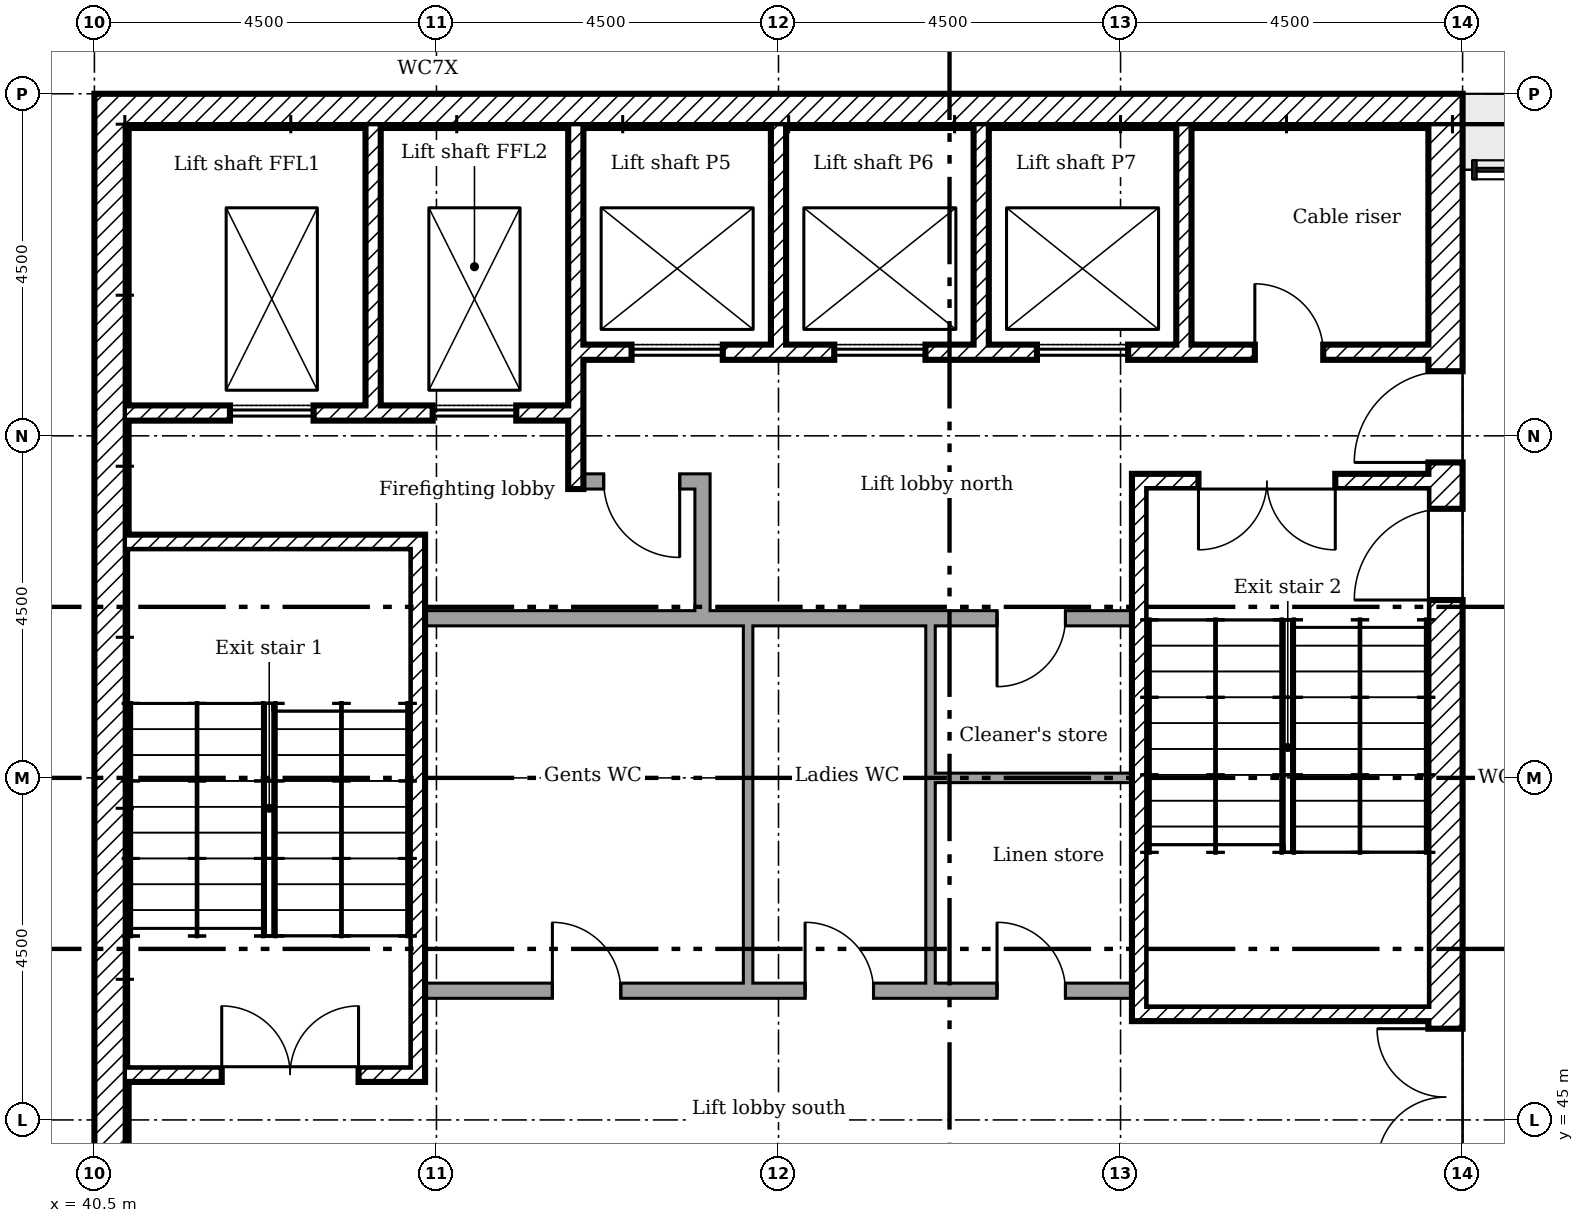
"""IFC4 building model, lengths in metres.
Left out: names, types, materials, properties, quantities, classifications, styles, units other than length and angle.
Written with IfcOpenShell. Run it as: python <this file> out.ifc"""

import sys

from ifc_helpers import new_model, si_unit, direction, frame, frame_2d, origin, place, context, subcontext, project, spatial, rectangle, extrude, element, fill, save


model = new_model("IFC4")
c1 = context("Model", 3, precision=1e-05, world=origin(), true_north=direction((0.0, 1.0)))
c2 = subcontext(c1, "Body", "Model", "MODEL_VIEW")
j1 = project(units=[si_unit("LENGTHUNIT", "METRE"), si_unit("PLANEANGLEUNIT", "RADIAN")], contexts=[c1])
p1 = place(None, origin())
s1 = spatial("IfcSite", under=j1, at=p1, CompositionType="ELEMENT")
p2 = place(p1, origin())
s2 = spatial("IfcBuilding", under=s1, at=p2, CompositionType="ELEMENT")
p3 = place(p2, frame((0.0, 0.0, 269.6)))
s3 = spatial("IfcBuildingStorey", under=s2, at=p3, CompositionType="ELEMENT", Elevation=269.6)
p4 = place(p3, frame((58.275, 40.5, 0.0), z_axis=(0.0, 0.0, 1.0), x_axis=(0.0, 1.0, 0.0)))
e1 = element("IfcWall", 1, at=p4, inside=s3, PredefinedType="SHEAR", context=c2, shape_type="SweptSolid", body=[
    extrude(rectangle(XDim=18.0, YDim=0.45, at=frame_2d((9.0, 0.0))), origin(), (0.0, 0.0, 1.0), 4.75),
])
p5 = place(p4, frame((13.15, 0.0, 0.0)))
e2 = element("IfcOpeningElement", 2, at=p5, cuts=e1, PredefinedType="OPENING", context=c2, shape_type="SweptSolid", body=[
    extrude(rectangle(XDim=1.2, YDim=2.1, at=frame_2d((0.6, 1.05))), frame((0.0, 0.235, 0.0), z_axis=(0.0, -1.0, 0.0), x_axis=(1.0, 0.0, 0.0)), (0.0, 0.0, 1.0), 0.47),
])
p6 = place(p4, frame((3.9, 0.0, 0.0)))
e3 = element("IfcOpeningElement", 3, at=p6, cuts=e1, PredefinedType="OPENING", context=c2, shape_type="SweptSolid", body=[
    extrude(rectangle(XDim=1.8, YDim=2.1, at=frame_2d((0.9, 1.05))), frame((0.0, 0.235, 0.0), z_axis=(0.0, -1.0, 0.0), x_axis=(1.0, 0.0, 0.0)), (0.0, 0.0, 1.0), 0.47),
])
p7 = place(p4, frame((11.34, 0.0, 0.0)))
e4 = element("IfcOpeningElement", 4, at=p7, cuts=e1, PredefinedType="OPENING", context=c2, shape_type="SweptSolid", body=[
    extrude(rectangle(XDim=1.2, YDim=2.1, at=frame_2d((0.6, 1.05))), frame((0.0, 0.235, 0.0), z_axis=(0.0, -1.0, 0.0), x_axis=(1.0, 0.0, 0.0)), (0.0, 0.0, 1.0), 0.47),
])
p8 = place(p3, frame((40.5, 58.275, 0.0)))
e5 = element("IfcWall", 5, at=p8, inside=s3, PredefinedType="SHEAR", context=c2, shape_type="SweptSolid", body=[
    extrude(rectangle(XDim=17.55, YDim=0.45, at=frame_2d((8.775, 0.0))), origin(), (0.0, 0.0, 1.0), 4.75),
])
p9 = place(p3, frame((40.725, 40.95, 0.0), z_axis=(0.0, 0.0, 1.0), x_axis=(0.0, 1.0, 0.0)))
e6 = element("IfcWall", 6, at=p9, inside=s3, PredefinedType="SHEAR", context=c2, shape_type="SweptSolid", body=[
    extrude(rectangle(XDim=17.1, YDim=0.45, at=frame_2d((8.55, 0.0))), origin(), (0.0, 0.0, 1.0), 4.75),
])
p10 = place(p3, frame((44.167, 58.05, 0.0), z_axis=(0.0, 0.0, 1.0), x_axis=(0.0, -1.0, 0.0)))
e7 = element("IfcWall", 7, at=p10, inside=s3, PredefinedType="SHEAR", context=c2, shape_type="SweptSolid", body=[
    extrude(rectangle(XDim=3.65, YDim=0.2, at=frame_2d((1.825, 0.0))), origin(), (0.0, 0.0, 1.0), 4.75),
])
p11 = place(p3, frame((46.833, 58.05, 0.0), z_axis=(0.0, 0.0, 1.0), x_axis=(0.0, -1.0, 0.0)))
e8 = element("IfcWall", 8, at=p11, inside=s3, PredefinedType="SHEAR", context=c2, shape_type="SweptSolid", body=[
    extrude(rectangle(XDim=4.75, YDim=0.2, at=frame_2d((2.375, 0.0))), origin(), (0.0, 0.0, 1.0), 4.75),
])
for number, where, z_axis, x_axis in (
    (9, (49.5, 58.05, 0.0), (0.0, 0.0, 1.0), (0.0, -1.0, 0.0)),
    (10, (52.167, 58.05, 0.0), (0.0, 0.0, 1.0), (0.0, -1.0, 0.0)),
    (11, (54.833, 58.05, 0.0), (0.0, 0.0, 1.0), (0.0, -1.0, 0.0)),
):
    element("IfcWall", number, at=place(p3, frame(where, z_axis=z_axis, x_axis=x_axis)), inside=s3, PredefinedType="SHEAR", context=c2, shape_type="SweptSolid", body=[
        extrude(rectangle(XDim=2.85, YDim=0.2, at=frame_2d((1.425, 0.0))), origin(), (0.0, 0.0, 1.0), 4.75),
    ])
p12 = place(p3, frame((48.5, 51.6, 0.0), z_axis=(0.0, 0.0, 1.0), x_axis=(0.0, 1.0, 0.0)))
e12 = element("IfcWall", 12, at=p12, inside=s3, PredefinedType="PARTITIONING", context=c2, shape_type="SweptSolid", body=[
    extrude(rectangle(XDim=1.9, YDim=0.2, at=frame_2d((0.95, 0.0))), origin(), (0.0, 0.0, 1.0), 4.75),
])
p13 = place(p3, frame((46.933, 53.4, 0.0)))
e13 = element("IfcWall", 13, at=p13, inside=s3, PredefinedType="PARTITIONING", context=c2, shape_type="SweptSolid", body=[
    extrude(rectangle(XDim=1.467, YDim=0.2, at=frame_2d((0.733, 0.0))), origin(), (0.0, 0.0, 1.0), 4.75),
])
p14 = place(p13, frame((0.267, 0.0, 0.0)))
e14 = element("IfcOpeningElement", 14, at=p14, cuts=e13, PredefinedType="OPENING", context=c2, shape_type="SweptSolid", body=[
    extrude(rectangle(XDim=1.0, YDim=2.1, at=frame_2d((0.5, 1.05))), frame((0.0, 0.11, 0.0), z_axis=(0.0, -1.0, 0.0), x_axis=(1.0, 0.0, 0.0)), (0.0, 0.0, 1.0), 0.22),
])
p15 = place(p3, frame((46.933, 55.1, 0.0)))
e15 = element("IfcWall", 15, at=p15, inside=s3, PredefinedType="SHEAR", context=c2, shape_type="SweptSolid", body=[
    extrude(rectangle(XDim=11.117, YDim=0.2, at=frame_2d((5.558, 0.0))), origin(), (0.0, 0.0, 1.0), 4.75),
])
p16 = place(p15, frame((8.833, 0.0, 0.0)))
e16 = element("IfcOpeningElement", 16, at=p16, cuts=e15, PredefinedType="OPENING", context=c2, shape_type="SweptSolid", body=[
    extrude(rectangle(XDim=0.9, YDim=2.1, at=frame_2d((0.45, 1.05))), frame((0.0, 0.11, 0.0), z_axis=(0.0, -1.0, 0.0), x_axis=(1.0, 0.0, 0.0)), (0.0, 0.0, 1.0), 0.22),
])
p17 = place(p15, frame((0.633, 0.0, 0.0)))
e17 = element("IfcOpeningElement", 17, at=p17, cuts=e15, PredefinedType="OPENING", context=c2, shape_type="SweptSolid", body=[
    extrude(rectangle(XDim=1.2, YDim=2.1, at=frame_2d((0.6, 1.05))), frame((0.0, 0.11, 0.0), z_axis=(0.0, -1.0, 0.0), x_axis=(1.0, 0.0, 0.0)), (0.0, 0.0, 1.0), 0.22),
])
p18 = place(p15, frame((3.3, 0.0, 0.0)))
e18 = element("IfcOpeningElement", 18, at=p18, cuts=e15, PredefinedType="OPENING", context=c2, shape_type="SweptSolid", body=[
    extrude(rectangle(XDim=1.2, YDim=2.1, at=frame_2d((0.6, 1.05))), frame((0.0, 0.11, 0.0), z_axis=(0.0, -1.0, 0.0), x_axis=(1.0, 0.0, 0.0)), (0.0, 0.0, 1.0), 0.22),
])
p19 = place(p15, frame((5.967, 0.0, 0.0)))
e19 = element("IfcOpeningElement", 19, at=p19, cuts=e15, PredefinedType="OPENING", context=c2, shape_type="SweptSolid", body=[
    extrude(rectangle(XDim=1.2, YDim=2.1, at=frame_2d((0.6, 1.05))), frame((0.0, 0.11, 0.0), z_axis=(0.0, -1.0, 0.0), x_axis=(1.0, 0.0, 0.0)), (0.0, 0.0, 1.0), 0.22),
])
p20 = place(p3, frame((40.95, 54.3, 0.0)))
e20 = element("IfcWall", 20, at=p20, inside=s3, PredefinedType="SHEAR", context=c2, shape_type="SweptSolid", body=[
    extrude(rectangle(XDim=5.783, YDim=0.2, at=frame_2d((2.892, 0.0))), origin(), (0.0, 0.0, 1.0), 4.75),
])
p21 = place(p20, frame((1.333, 0.0, 0.0)))
e21 = element("IfcOpeningElement", 21, at=p21, cuts=e20, PredefinedType="OPENING", context=c2, shape_type="SweptSolid", body=[
    extrude(rectangle(XDim=1.1, YDim=2.1, at=frame_2d((0.55, 1.05))), frame((0.0, 0.11, 0.0), z_axis=(0.0, -1.0, 0.0), x_axis=(1.0, 0.0, 0.0)), (0.0, 0.0, 1.0), 0.22),
])
p22 = place(p20, frame((4.0, 0.0, 0.0)))
e22 = element("IfcOpeningElement", 22, at=p22, cuts=e20, PredefinedType="OPENING", context=c2, shape_type="SweptSolid", body=[
    extrude(rectangle(XDim=1.1, YDim=2.1, at=frame_2d((0.55, 1.05))), frame((0.0, 0.11, 0.0), z_axis=(0.0, -1.0, 0.0), x_axis=(1.0, 0.0, 0.0)), (0.0, 0.0, 1.0), 0.22),
])
p23 = place(p3, frame((44.75, 45.5, 0.0), z_axis=(0.0, 0.0, 1.0), x_axis=(0.0, 1.0, 0.0)))
e23 = element("IfcWall", 23, at=p23, inside=s3, PredefinedType="SHEAR", context=c2, shape_type="SweptSolid", body=[
    extrude(rectangle(XDim=7.2, YDim=0.2, at=frame_2d((3.6, 0.0))), origin(), (0.0, 0.0, 1.0), 4.75),
])
p24 = place(p3, frame((40.95, 52.6, 0.0)))
e24 = element("IfcWall", 24, at=p24, inside=s3, PredefinedType="SHEAR", context=c2, shape_type="SweptSolid", body=[
    extrude(rectangle(XDim=3.7, YDim=0.2, at=frame_2d((1.85, 0.0))), origin(), (0.0, 0.0, 1.0), 4.75),
])
p25 = place(p3, frame((40.95, 45.6, 0.0)))
e25 = element("IfcWall", 25, at=p25, inside=s3, PredefinedType="SHEAR", context=c2, shape_type="SweptSolid", body=[
    extrude(rectangle(XDim=3.7, YDim=0.2, at=frame_2d((1.85, 0.0))), origin(), (0.0, 0.0, 1.0), 4.75),
])
p26 = place(p25, frame((1.225, 0.0, 0.0)))
e26 = element("IfcOpeningElement", 26, at=p26, cuts=e25, PredefinedType="OPENING", context=c2, shape_type="SweptSolid", body=[
    extrude(rectangle(XDim=1.8, YDim=2.1, at=frame_2d((0.9, 1.05))), frame((0.0, 0.11, 0.0), z_axis=(0.0, -1.0, 0.0), x_axis=(1.0, 0.0, 0.0)), (0.0, 0.0, 1.0), 0.22),
])
p27 = place(p3, frame((54.15, 53.4, 0.0)))
e27 = element("IfcWall", 27, at=p27, inside=s3, PredefinedType="SHEAR", context=c2, shape_type="SweptSolid", body=[
    extrude(rectangle(XDim=3.9, YDim=0.2, at=frame_2d((1.95, 0.0))), origin(), (0.0, 0.0, 1.0), 4.75),
])
p28 = place(p27, frame((0.875, 0.0, 0.0)))
e28 = element("IfcOpeningElement", 28, at=p28, cuts=e27, PredefinedType="OPENING", context=c2, shape_type="SweptSolid", body=[
    extrude(rectangle(XDim=1.8, YDim=2.1, at=frame_2d((0.9, 1.05))), frame((0.0, 0.11, 0.0), z_axis=(0.0, -1.0, 0.0), x_axis=(1.0, 0.0, 0.0)), (0.0, 0.0, 1.0), 0.22),
])
p29 = place(p3, frame((54.15, 46.4, 0.0)))
e29 = element("IfcWall", 29, at=p29, inside=s3, PredefinedType="SHEAR", context=c2, shape_type="SweptSolid", body=[
    extrude(rectangle(XDim=3.9, YDim=0.2, at=frame_2d((1.95, 0.0))), origin(), (0.0, 0.0, 1.0), 4.75),
])
p30 = place(p3, frame((54.25, 46.5, 0.0), z_axis=(0.0, 0.0, 1.0), x_axis=(0.0, 1.0, 0.0)))
e30 = element("IfcWall", 30, at=p30, inside=s3, PredefinedType="SHEAR", context=c2, shape_type="SweptSolid", body=[
    extrude(rectangle(XDim=6.8, YDim=0.2, at=frame_2d((3.4, 0.0))), origin(), (0.0, 0.0, 1.0), 4.75),
])
p31 = place(p3, frame((44.85, 51.6, 0.0)))
e31 = element("IfcWall", 31, at=p31, inside=s3, PredefinedType="PARTITIONING", context=c2, shape_type="SweptSolid", body=[
    extrude(rectangle(XDim=9.3, YDim=0.2, at=frame_2d((4.65, 0.0))), origin(), (0.0, 0.0, 1.0), 4.75),
])
p32 = place(p31, frame((7.525, 0.0, 0.0)))
e32 = element("IfcOpeningElement", 32, at=p32, cuts=e31, PredefinedType="OPENING", context=c2, shape_type="SweptSolid", body=[
    extrude(rectangle(XDim=0.9, YDim=2.1, at=frame_2d((0.45, 1.05))), frame((0.0, 0.11, 0.0), z_axis=(0.0, -1.0, 0.0), x_axis=(1.0, 0.0, 0.0)), (0.0, 0.0, 1.0), 0.22),
])
p33 = place(p3, frame((44.85, 46.7, 0.0)))
e33 = element("IfcWall", 33, at=p33, inside=s3, PredefinedType="PARTITIONING", context=c2, shape_type="SweptSolid", body=[
    extrude(rectangle(XDim=9.3, YDim=0.2, at=frame_2d((4.65, 0.0))), origin(), (0.0, 0.0, 1.0), 4.75),
])
p34 = place(p33, frame((1.675, 0.0, 0.0)))
e34 = element("IfcOpeningElement", 34, at=p34, cuts=e33, PredefinedType="OPENING", context=c2, shape_type="SweptSolid", body=[
    extrude(rectangle(XDim=0.9, YDim=2.1, at=frame_2d((0.45, 1.05))), frame((0.0, 0.11, 0.0), z_axis=(0.0, -1.0, 0.0), x_axis=(1.0, 0.0, 0.0)), (0.0, 0.0, 1.0), 0.22),
])
p35 = place(p33, frame((5.0, 0.0, 0.0)))
e35 = element("IfcOpeningElement", 35, at=p35, cuts=e33, PredefinedType="OPENING", context=c2, shape_type="SweptSolid", body=[
    extrude(rectangle(XDim=0.9, YDim=2.1, at=frame_2d((0.45, 1.05))), frame((0.0, 0.11, 0.0), z_axis=(0.0, -1.0, 0.0), x_axis=(1.0, 0.0, 0.0)), (0.0, 0.0, 1.0), 0.22),
])
p36 = place(p33, frame((7.525, 0.0, 0.0)))
e36 = element("IfcOpeningElement", 36, at=p36, cuts=e33, PredefinedType="OPENING", context=c2, shape_type="SweptSolid", body=[
    extrude(rectangle(XDim=0.9, YDim=2.1, at=frame_2d((0.45, 1.05))), frame((0.0, 0.11, 0.0), z_axis=(0.0, -1.0, 0.0), x_axis=(1.0, 0.0, 0.0)), (0.0, 0.0, 1.0), 0.22),
])
p37 = place(p3, frame((49.1, 46.8, 0.0), z_axis=(0.0, 0.0, 1.0), x_axis=(0.0, 1.0, 0.0)))
e37 = element("IfcWall", 37, at=p37, inside=s3, PredefinedType="PARTITIONING", context=c2, shape_type="SweptSolid", body=[
    extrude(rectangle(XDim=4.7, YDim=0.125, at=frame_2d((2.35, 0.0))), origin(), (0.0, 0.0, 1.0), 4.75),
])
p38 = place(p3, frame((51.5, 46.8, 0.0), z_axis=(0.0, 0.0, 1.0), x_axis=(0.0, 1.0, 0.0)))
e38 = element("IfcWall", 38, at=p38, inside=s3, PredefinedType="PARTITIONING", context=c2, shape_type="SweptSolid", body=[
    extrude(rectangle(XDim=2.762, YDim=0.125, at=frame_2d((1.381, 0.0))), origin(), (0.0, 0.0, 1.0), 4.75),
])
p39 = place(p3, frame((51.562, 49.5, 0.0)))
e39 = element("IfcWall", 39, at=p39, inside=s3, PredefinedType="PARTITIONING", context=c2, shape_type="SweptSolid", body=[
    extrude(rectangle(XDim=2.587, YDim=0.125, at=frame_2d((1.294, 0.0))), origin(), (0.0, 0.0, 1.0), 4.75),
])
p40 = place(p3, frame((51.5, 49.5, 0.0), z_axis=(0.0, 0.0, 1.0), x_axis=(0.0, 1.0, 0.0)))
e40 = element("IfcWall", 40, at=p40, inside=s3, PredefinedType="PARTITIONING", context=c2, shape_type="SweptSolid", body=[
    extrude(rectangle(XDim=2.0, YDim=0.125, at=frame_2d((1.0, 0.0))), origin(), (0.0, 0.0, 1.0), 4.75),
])
p41 = place(p5, origin())
e41 = element("IfcDoor", 41, at=p41, inside=s3, OperationType="SINGLE_SWING_RIGHT", PredefinedType="DOOR", context=c2, shape_type="SweptSolid", body=[
    extrude(rectangle(XDim=1.2, YDim=2.1, at=frame_2d((0.6, 1.05))), frame((0.0, 0.025, 0.0), z_axis=(0.0, -1.0, 0.0), x_axis=(1.0, 0.0, 0.0)), (0.0, 0.0, 1.0), 0.05),
])
fill(e2, e41)
p42 = place(p6, origin())
e42 = element("IfcDoor", 42, at=p42, inside=s3, OperationType="DOUBLE_DOOR_SINGLE_SWING", PredefinedType="DOOR", context=c2, shape_type="SweptSolid", body=[
    extrude(rectangle(XDim=1.8, YDim=2.1, at=frame_2d((0.9, 1.05))), frame((0.0, 0.025, 0.0), z_axis=(0.0, -1.0, 0.0), x_axis=(1.0, 0.0, 0.0)), (0.0, 0.0, 1.0), 0.05),
])
fill(e3, e42)
p43 = place(p26, origin())
e43 = element("IfcDoor", 43, at=p43, inside=s3, OperationType="DOUBLE_DOOR_SINGLE_SWING", PredefinedType="DOOR", context=c2, shape_type="SweptSolid", body=[
    extrude(rectangle(XDim=1.8, YDim=2.1, at=frame_2d((0.9, 1.05))), frame((0.0, 0.025, 0.0), z_axis=(0.0, -1.0, 0.0), x_axis=(1.0, 0.0, 0.0)), (0.0, 0.0, 1.0), 0.05),
])
fill(e26, e43)
p44 = place(p28, frame((1.8, 0.0, 0.0), x_axis=(-1.0, 0.0, 0.0)))
e44 = element("IfcDoor", 44, at=p44, inside=s3, OperationType="DOUBLE_DOOR_SINGLE_SWING", PredefinedType="DOOR", context=c2, shape_type="SweptSolid", body=[
    extrude(rectangle(XDim=1.8, YDim=2.1, at=frame_2d((0.9, 1.05))), frame((0.0, 0.025, 0.0), z_axis=(0.0, -1.0, 0.0), x_axis=(1.0, 0.0, 0.0)), (0.0, 0.0, 1.0), 0.05),
])
fill(e28, e44)
p45 = place(p7, origin())
e45 = element("IfcDoor", 45, at=p45, inside=s3, OperationType="SINGLE_SWING_RIGHT", PredefinedType="DOOR", context=c2, shape_type="SweptSolid", body=[
    extrude(rectangle(XDim=1.2, YDim=2.1, at=frame_2d((0.6, 1.05))), frame((0.0, 0.025, 0.0), z_axis=(0.0, -1.0, 0.0), x_axis=(1.0, 0.0, 0.0)), (0.0, 0.0, 1.0), 0.05),
])
fill(e4, e45)
p46 = place(p14, frame((1.0, 0.0, 0.0), x_axis=(-1.0, 0.0, 0.0)))
e46 = element("IfcDoor", 46, at=p46, inside=s3, OperationType="SINGLE_SWING_RIGHT", PredefinedType="DOOR", context=c2, shape_type="SweptSolid", body=[
    extrude(rectangle(XDim=1.0, YDim=2.1, at=frame_2d((0.5, 1.05))), frame((0.0, 0.025, 0.0), z_axis=(0.0, -1.0, 0.0), x_axis=(1.0, 0.0, 0.0)), (0.0, 0.0, 1.0), 0.05),
])
fill(e14, e46)
p47 = place(p16, origin())
e47 = element("IfcDoor", 47, at=p47, inside=s3, OperationType="SINGLE_SWING_RIGHT", PredefinedType="DOOR", context=c2, shape_type="SweptSolid", body=[
    extrude(rectangle(XDim=0.9, YDim=2.1, at=frame_2d((0.45, 1.05))), frame((0.0, 0.025, 0.0), z_axis=(0.0, -1.0, 0.0), x_axis=(1.0, 0.0, 0.0)), (0.0, 0.0, 1.0), 0.05),
])
fill(e16, e47)
p48 = place(p34, origin())
e48 = element("IfcDoor", 48, at=p48, inside=s3, OperationType="SINGLE_SWING_RIGHT", PredefinedType="DOOR", context=c2, shape_type="SweptSolid", body=[
    extrude(rectangle(XDim=0.9, YDim=2.1, at=frame_2d((0.45, 1.05))), frame((0.0, 0.025, 0.0), z_axis=(0.0, -1.0, 0.0), x_axis=(1.0, 0.0, 0.0)), (0.0, 0.0, 1.0), 0.05),
])
fill(e34, e48)
p49 = place(p35, origin())
e49 = element("IfcDoor", 49, at=p49, inside=s3, OperationType="SINGLE_SWING_RIGHT", PredefinedType="DOOR", context=c2, shape_type="SweptSolid", body=[
    extrude(rectangle(XDim=0.9, YDim=2.1, at=frame_2d((0.45, 1.05))), frame((0.0, 0.025, 0.0), z_axis=(0.0, -1.0, 0.0), x_axis=(1.0, 0.0, 0.0)), (0.0, 0.0, 1.0), 0.05),
])
fill(e35, e49)
p50 = place(p32, frame((0.9, 0.0, 0.0), x_axis=(-1.0, 0.0, 0.0)))
e50 = element("IfcDoor", 50, at=p50, inside=s3, OperationType="SINGLE_SWING_LEFT", PredefinedType="DOOR", context=c2, shape_type="SweptSolid", body=[
    extrude(rectangle(XDim=0.9, YDim=2.1, at=frame_2d((0.45, 1.05))), frame((0.0, 0.025, 0.0), z_axis=(0.0, -1.0, 0.0), x_axis=(1.0, 0.0, 0.0)), (0.0, 0.0, 1.0), 0.05),
])
fill(e32, e50)
p51 = place(p36, origin())
e51 = element("IfcDoor", 51, at=p51, inside=s3, OperationType="SINGLE_SWING_RIGHT", PredefinedType="DOOR", context=c2, shape_type="SweptSolid", body=[
    extrude(rectangle(XDim=0.9, YDim=2.1, at=frame_2d((0.45, 1.05))), frame((0.0, 0.025, 0.0), z_axis=(0.0, -1.0, 0.0), x_axis=(1.0, 0.0, 0.0)), (0.0, 0.0, 1.0), 0.05),
])
fill(e36, e51)
p52 = place(p21, origin())
e52 = element("IfcDoor", 52, at=p52, inside=s3, OperationType="SLIDING_TO_LEFT", PredefinedType="DOOR", context=c2, shape_type="SweptSolid", body=[
    extrude(rectangle(XDim=1.1, YDim=2.1, at=frame_2d((0.55, 1.05))), frame((0.0, 0.025, 0.0), z_axis=(0.0, -1.0, 0.0), x_axis=(1.0, 0.0, 0.0)), (0.0, 0.0, 1.0), 0.05),
])
fill(e21, e52)
p53 = place(p22, origin())
e53 = element("IfcDoor", 53, at=p53, inside=s3, OperationType="SLIDING_TO_LEFT", PredefinedType="DOOR", context=c2, shape_type="SweptSolid", body=[
    extrude(rectangle(XDim=1.1, YDim=2.1, at=frame_2d((0.55, 1.05))), frame((0.0, 0.025, 0.0), z_axis=(0.0, -1.0, 0.0), x_axis=(1.0, 0.0, 0.0)), (0.0, 0.0, 1.0), 0.05),
])
fill(e22, e53)
p54 = place(p17, origin())
e54 = element("IfcDoor", 54, at=p54, inside=s3, OperationType="SLIDING_TO_LEFT", PredefinedType="DOOR", context=c2, shape_type="SweptSolid", body=[
    extrude(rectangle(XDim=1.2, YDim=2.1, at=frame_2d((0.6, 1.05))), frame((0.0, 0.025, 0.0), z_axis=(0.0, -1.0, 0.0), x_axis=(1.0, 0.0, 0.0)), (0.0, 0.0, 1.0), 0.05),
])
fill(e17, e54)
p55 = place(p18, origin())
e55 = element("IfcDoor", 55, at=p55, inside=s3, OperationType="SLIDING_TO_LEFT", PredefinedType="DOOR", context=c2, shape_type="SweptSolid", body=[
    extrude(rectangle(XDim=1.2, YDim=2.1, at=frame_2d((0.6, 1.05))), frame((0.0, 0.025, 0.0), z_axis=(0.0, -1.0, 0.0), x_axis=(1.0, 0.0, 0.0)), (0.0, 0.0, 1.0), 0.05),
])
fill(e18, e55)
p56 = place(p19, origin())
e56 = element("IfcDoor", 56, at=p56, inside=s3, OperationType="SLIDING_TO_LEFT", PredefinedType="DOOR", context=c2, shape_type="SweptSolid", body=[
    extrude(rectangle(XDim=1.2, YDim=2.1, at=frame_2d((0.6, 1.05))), frame((0.0, 0.025, 0.0), z_axis=(0.0, -1.0, 0.0), x_axis=(1.0, 0.0, 0.0)), (0.0, 0.0, 1.0), 0.05),
])
fill(e19, e56)
save(model, sys.argv[1])
